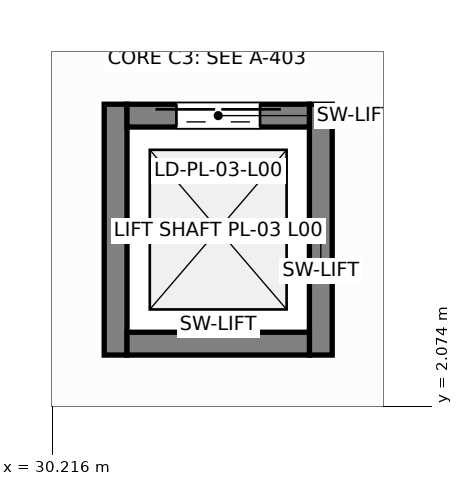
"""IFC4 building model, lengths in metres.
Left out: names, types, materials, properties, quantities, classifications, styles, units other than length and angle.
Written with IfcOpenShell. Run it as: python <this file> out.ifc"""

import sys

from ifc_helpers import new_model, si_unit, direction, frame, frame_2d, origin, place, context, subcontext, project, spatial, rectangle, extrude, element, fill, save


model = new_model("IFC4")
c1 = context("Model", 3, precision=1e-05, world=origin(), true_north=direction((0.0, 1.0)))
c2 = subcontext(c1, "Body", "Model", "MODEL_VIEW")
j1 = project(units=[si_unit("LENGTHUNIT", "METRE"), si_unit("PLANEANGLEUNIT", "RADIAN")], contexts=[c1])
p1 = place(None, origin())
s1 = spatial("IfcSite", under=j1, at=p1, CompositionType="ELEMENT")
p2 = place(p1, origin())
s2 = spatial("IfcBuilding", under=s1, at=p2, CompositionType="ELEMENT")
p3 = place(p2, origin())
s3 = spatial("IfcBuildingStorey", under=s2, at=p3, CompositionType="ELEMENT", Elevation=0.0)
for number, where, z_axis, x_axis in (
    (1, (31.05, 2.75, 0.0), (0.0, 0.0, 1.0), (0.0, 1.0, 0.0)),
    (2, (33.75, 2.75, 0.0), (0.0, 0.0, 1.0), (0.0, 1.0, 0.0)),
):
    element("IfcWall", number, at=place(p3, frame(where, z_axis=z_axis, x_axis=x_axis)), inside=s3, PredefinedType="SHEAR", context=c2, shape_type="SweptSolid", body=[
        extrude(rectangle(XDim=3.3, YDim=0.3, at=frame_2d((1.65, 0.0))), origin(), (0.0, 0.0, 1.0), 4.56),
    ])
p4 = place(p3, frame((31.2, 5.9, 0.0), z_axis=(0.0, 0.0, 1.0), x_axis=(1.0, 0.0, 0.0)))
e3 = element("IfcWall", 3, at=p4, inside=s3, PredefinedType="SHEAR", context=c2, shape_type="SweptSolid", body=[
    extrude(rectangle(XDim=2.4, YDim=0.3, at=frame_2d((1.2, 0.0))), origin(), (0.0, 0.0, 1.0), 4.56),
])
p5 = place(p4, frame((0.65, 0.0, 0.0)))
e4 = element("IfcOpeningElement", 4, at=p5, cuts=e3, PredefinedType="OPENING", context=c2, shape_type="SweptSolid", body=[
    extrude(rectangle(XDim=1.1, YDim=2.15, at=frame_2d((0.55, 1.075))), frame((0.0, 0.16, 0.0), z_axis=(0.0, -1.0, 0.0), x_axis=(1.0, 0.0, 0.0)), (0.0, 0.0, 1.0), 0.32),
])
p6 = place(p3, frame((31.2, 2.9, 0.0), z_axis=(0.0, 0.0, 1.0), x_axis=(1.0, 0.0, 0.0)))
e5 = element("IfcWall", 5, at=p6, inside=s3, PredefinedType="SHEAR", context=c2, shape_type="SweptSolid", body=[
    extrude(rectangle(XDim=2.4, YDim=0.3, at=frame_2d((1.2, 0.0))), origin(), (0.0, 0.0, 1.0), 4.56),
])
p7 = place(p5, origin())
e6 = element("IfcDoor", 6, at=p7, inside=s3, OperationType="DOUBLE_DOOR_SLIDING", PredefinedType="DOOR", context=c2, shape_type="SweptSolid", body=[
    extrude(rectangle(XDim=1.1, YDim=2.15, at=frame_2d((0.55, 1.075))), frame((0.0, 0.025, 0.0), z_axis=(0.0, -1.0, 0.0), x_axis=(1.0, 0.0, 0.0)), (0.0, 0.0, 1.0), 0.05),
])
fill(e4, e6)
save(model, sys.argv[1])
